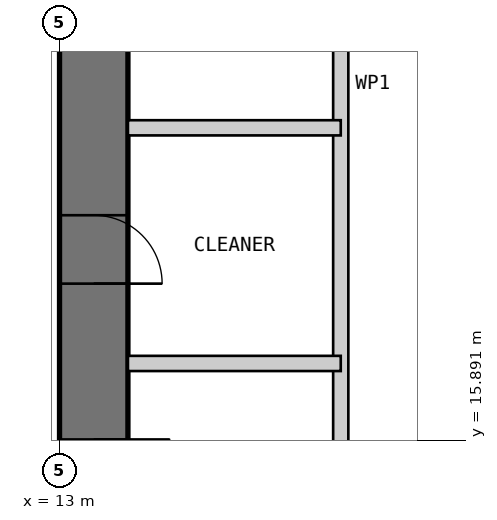
"""IFC4 building model, lengths in metres.
Left out: names, types, materials, properties, quantities, classifications, styles, units other than length and angle.
Written with IfcOpenShell. Run it as: python <this file> out.ifc"""

import sys

from ifc_helpers import new_model, si_unit, direction, frame, frame_2d, origin, place, context, subcontext, project, spatial, polyline, rectangle, outline, extrude, element, fill, save


model = new_model("IFC4")
c1 = context("Model", 3, precision=1e-05, world=origin(), true_north=direction((0.0, 1.0)))
c2 = subcontext(c1, "Body", "Model", "MODEL_VIEW")
j1 = project(units=[si_unit("LENGTHUNIT", "METRE"), si_unit("PLANEANGLEUNIT", "RADIAN")], contexts=[c1])
p1 = place(None, origin())
s1 = spatial("IfcSite", under=j1, at=p1, CompositionType="ELEMENT")
p2 = place(p1, origin())
s2 = spatial("IfcBuilding", under=s1, at=p2, CompositionType="ELEMENT")
p3 = place(p2, frame((0.0, 0.0, 21.4)))
s3 = spatial("IfcBuildingStorey", under=s2, at=p3, CompositionType="ELEMENT", Elevation=21.4)
p4 = place(p3, frame((13.45, 36.1, 0.0), z_axis=(0.0, 0.0, 1.0), x_axis=(0.0, -1.0, 0.0)))
e1 = element("IfcWall", 1, at=p4, inside=s3, PredefinedType="SHEAR", context=c2, shape_type="SweptSolid", body=[
    extrude(outline(polyline([(-0.9, -0.45), (23.1, -0.45), (22.2, 0.45), (0.0, 0.45), (-0.9, -0.45)])), origin(), (0.0, 0.0, 1.0), 4.8),
])
p5 = place(p4, frame((20.2, 0.0, 0.0)))
e2 = element("IfcOpeningElement", 2, at=p5, cuts=e1, PredefinedType="OPENING", context=c2, shape_type="SweptSolid", body=[
    extrude(rectangle(XDim=1.0, YDim=2.2, at=frame_2d((0.5, 1.1))), frame((0.0, 0.46, 0.0), z_axis=(0.0, -1.0, 0.0), x_axis=(1.0, 0.0, 0.0)), (0.0, 0.0, 1.0), 0.92),
])
p6 = place(p4, frame((17.25, 0.0, 0.0)))
e3 = element("IfcOpeningElement", 3, at=p6, cuts=e1, PredefinedType="OPENING", context=c2, shape_type="SweptSolid", body=[
    extrude(rectangle(XDim=0.9, YDim=2.2, at=frame_2d((0.45, 1.1))), frame((0.0, 0.46, 0.0), z_axis=(0.0, -1.0, 0.0), x_axis=(1.0, 0.0, 0.0)), (0.0, 0.0, 1.0), 0.92),
])
p7 = place(p3, frame((16.7, 13.9, 0.0), z_axis=(0.0, 0.0, 1.0), x_axis=(0.0, 1.0, 0.0)))
e4 = element("IfcWall", 4, at=p7, inside=s3, PredefinedType="PARTITIONING", context=c2, shape_type="SweptSolid", body=[
    extrude(rectangle(XDim=16.1, YDim=0.2, at=frame_2d((8.05, 0.0))), origin(), (0.0, 0.0, 1.0), 4.6),
])
for number, where, z_axis, x_axis in (
    (5, (13.9, 20.0, 0.0), (0.0, 0.0, 1.0), (1.0, 0.0, 0.0)),
    (6, (13.9, 16.9, 0.0), (0.0, 0.0, 1.0), (1.0, 0.0, 0.0)),
):
    element("IfcWall", number, at=place(p3, frame(where, z_axis=z_axis, x_axis=x_axis)), inside=s3, PredefinedType="PARTITIONING", context=c2, shape_type="SweptSolid", body=[
        extrude(rectangle(XDim=2.8, YDim=0.2, at=frame_2d((1.4, 0.0))), origin(), (0.0, 0.0, 1.0), 4.6),
    ])
p8 = place(p5, origin())
e7 = element("IfcDoor", 7, at=p8, inside=s3, OperationType="SINGLE_SWING_LEFT", PredefinedType="DOOR", context=c2, shape_type="SweptSolid", body=[
    extrude(rectangle(XDim=1.0, YDim=2.2, at=frame_2d((0.5, 1.1))), frame((0.0, 0.025, 0.0), z_axis=(0.0, -1.0, 0.0), x_axis=(1.0, 0.0, 0.0)), (0.0, 0.0, 1.0), 0.05),
    extrude(outline(polyline([(0.0, 0.0), (0.04, 0.0), (0.04, 2.16), (0.96, 2.16), (0.96, 0.0), (1.0, 0.0), (1.0, 2.2), (0.0, 2.2), (0.0, 0.0)])), frame((0.0, 0.3, 0.0), z_axis=(0.0, -1.0, 0.0), x_axis=(1.0, 0.0, 0.0)), (0.0, 0.0, 1.0), 0.6),
])
fill(e2, e7)
p9 = place(p6, origin())
e8 = element("IfcDoor", 8, at=p9, inside=s3, OperationType="SINGLE_SWING_RIGHT", PredefinedType="DOOR", context=c2, shape_type="SweptSolid", body=[
    extrude(rectangle(XDim=0.9, YDim=2.2, at=frame_2d((0.45, 1.1))), frame((0.0, 0.025, 0.0), z_axis=(0.0, -1.0, 0.0), x_axis=(1.0, 0.0, 0.0)), (0.0, 0.0, 1.0), 0.05),
    extrude(outline(polyline([(0.0, 0.0), (0.04, 0.0), (0.04, 2.16), (0.86, 2.16), (0.86, 0.0), (0.9, 0.0), (0.9, 2.2), (0.0, 2.2), (0.0, 0.0)])), frame((0.0, 0.3, 0.0), z_axis=(0.0, -1.0, 0.0), x_axis=(1.0, 0.0, 0.0)), (0.0, 0.0, 1.0), 0.6),
])
fill(e3, e8)
save(model, sys.argv[1])
